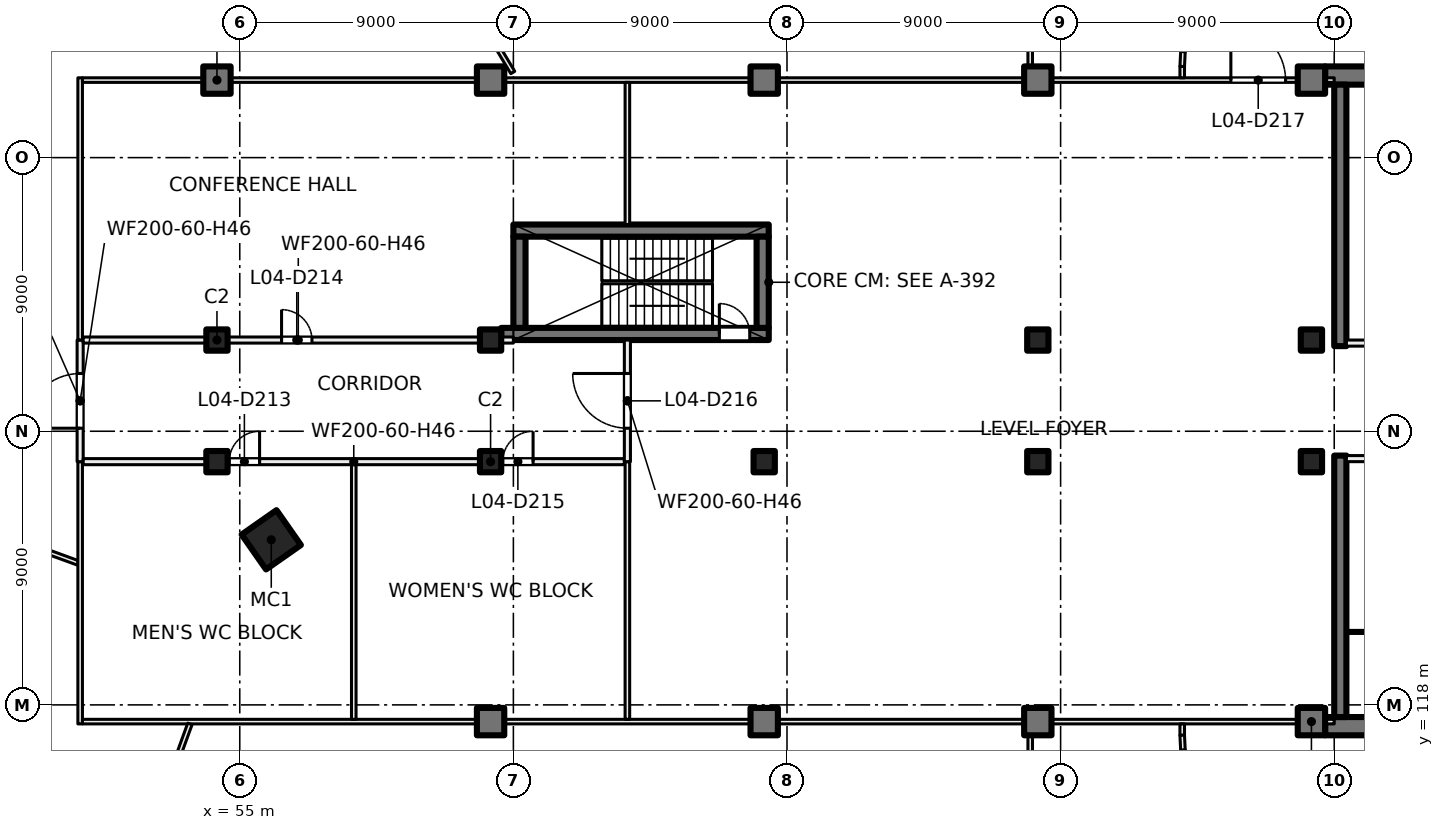
"""IFC4 building model, lengths in metres.
Left out: names, types, materials, properties, quantities, classifications, styles, units other than length and angle.
Written with IfcOpenShell. Run it as: python <this file> out.ifc"""

import sys

from ifc_helpers import new_model, si_unit, direction, frame, frame_2d, origin, origin_2d, place, context, subcontext, project, spatial, rectangle, hollow_rectangle, extrude, element, fill, save


model = new_model("IFC4")
c1 = context("Model", 3, precision=1e-05, world=origin(), true_north=direction((0.0, 1.0)))
c2 = subcontext(c1, "Body", "Model", "MODEL_VIEW")
j1 = project(units=[si_unit("LENGTHUNIT", "METRE"), si_unit("PLANEANGLEUNIT", "RADIAN")], contexts=[c1])
p1 = place(None, origin())
s1 = spatial("IfcSite", under=j1, at=p1, CompositionType="ELEMENT")
p2 = place(p1, origin())
s2 = spatial("IfcBuilding", under=s1, at=p2, CompositionType="ELEMENT")
p3 = place(p2, frame((0.0, 0.0, 22.5)))
s3 = spatial("IfcBuildingStorey", under=s2, at=p3, CompositionType="ELEMENT", Elevation=22.5)
p4 = place(p3, frame((56.036, 123.43, 0.0), z_axis=(0.0, 0.0, 1.0), x_axis=(0.573576436351, -0.819152044289, 0.0)))
e1 = element("IfcColumn", 1, at=p4, inside=s3, PredefinedType="COLUMN", context=c2, shape_type="SweptSolid", body=[
    extrude(hollow_rectangle(XDim=1.4, YDim=1.4, WallThickness=0.04, at=origin_2d()), origin(), (0.0, 0.0, 1.0), 5.0),
])
for number, where, z_axis, x_axis in (
    (2, (54.25, 130.0, 0.0), (0.0, 0.0, 1.0), (1.0, 0.0, 0.0)),
    (3, (63.25, 130.0, 0.0), (0.0, 0.0, 1.0), (1.0, 0.0, 0.0)),
    (4, (81.25, 130.0, 0.0), (0.0, 0.0, 1.0), (1.0, 0.0, 0.0)),
    (5, (90.25, 130.0, 0.0), (0.0, 0.0, 1.0), (1.0, 0.0, 0.0)),
    (6, (54.25, 126.0, 0.0), (0.0, 0.0, 1.0), (1.0, 0.0, 0.0)),
    (7, (63.25, 126.0, 0.0), (0.0, 0.0, 1.0), (1.0, 0.0, 0.0)),
    (8, (72.25, 126.0, 0.0), (0.0, 0.0, 1.0), (1.0, 0.0, 0.0)),
    (9, (81.25, 126.0, 0.0), (0.0, 0.0, 1.0), (1.0, 0.0, 0.0)),
    (10, (90.25, 126.0, 0.0), (0.0, 0.0, 1.0), (1.0, 0.0, 0.0)),
):
    element("IfcColumn", number, at=place(p3, frame(where, z_axis=z_axis, x_axis=x_axis)), inside=s3, PredefinedType="COLUMN", context=c2, shape_type="SweptSolid", body=[
        extrude(rectangle(XDim=0.7, YDim=0.7, at=origin_2d()), origin(), (0.0, 0.0, 1.0), 5.0),
    ])
for number, where, z_axis, x_axis in (
    (11, (54.25, 138.55, 0.0), (0.0, 0.0, 1.0), (1.0, 0.0, 0.0)),
    (12, (63.25, 138.55, 0.0), (0.0, 0.0, 1.0), (1.0, 0.0, 0.0)),
    (13, (72.25, 138.55, 0.0), (0.0, 0.0, 1.0), (1.0, 0.0, 0.0)),
    (14, (81.25, 138.55, 0.0), (0.0, 0.0, 1.0), (1.0, 0.0, 0.0)),
    (15, (90.25, 138.55, 0.0), (0.0, 0.0, 1.0), (1.0, 0.0, 0.0)),
    (16, (63.25, 117.45, 0.0), (0.0, 0.0, 1.0), (1.0, 0.0, 0.0)),
    (17, (72.25, 117.45, 0.0), (0.0, 0.0, 1.0), (1.0, 0.0, 0.0)),
    (18, (81.25, 117.45, 0.0), (0.0, 0.0, 1.0), (1.0, 0.0, 0.0)),
    (19, (90.25, 117.45, 0.0), (0.0, 0.0, 1.0), (1.0, 0.0, 0.0)),
):
    element("IfcColumn", number, at=place(p3, frame(where, z_axis=z_axis, x_axis=x_axis)), inside=s3, PredefinedType="COLUMN", context=c2, shape_type="SweptSolid", body=[
        extrude(rectangle(XDim=0.9, YDim=0.9, at=origin_2d()), origin(), (0.0, 0.0, 1.0), 5.0),
    ])
for number, where, z_axis, x_axis in (
    (20, (99.6, 138.7, 0.0), (0.0, 0.0, 1.0), (-1.0, 0.0, 0.0)),
    (21, (99.6, 117.3, 0.0), (0.0, 0.0, 1.0), (-1.0, 0.0, 0.0)),
):
    element("IfcWall", number, at=place(p3, frame(where, z_axis=z_axis, x_axis=x_axis)), inside=s3, PredefinedType="SHEAR", context=c2, shape_type="SweptSolid", body=[
        extrude(rectangle(XDim=8.9, YDim=0.6, at=frame_2d((4.45, 0.0))), origin(), (0.0, 0.0, 1.0), 5.0),
    ])
for number, where, z_axis, x_axis in (
    (22, (91.2, 138.4, 0.0), (0.0, 0.0, 1.0), (0.0, -1.0, 0.0)),
    (23, (91.2, 126.2, 0.0), (0.0, 0.0, 1.0), (0.0, -1.0, 0.0)),
):
    element("IfcWall", number, at=place(p3, frame(where, z_axis=z_axis, x_axis=x_axis)), inside=s3, PredefinedType="SHEAR", context=c2, shape_type="SweptSolid", body=[
        extrude(rectangle(XDim=8.6, YDim=0.4, at=frame_2d((4.3, 0.0))), origin(), (0.0, 0.0, 1.0), 5.0),
    ])
p5 = place(p3, frame((63.6, 130.2, 0.0), z_axis=(0.0, 0.0, 1.0), x_axis=(1.0, 0.0, 0.0)))
e24 = element("IfcWall", 24, at=p5, inside=s3, PredefinedType="SHEAR", context=c2, shape_type="SweptSolid", body=[
    extrude(rectangle(XDim=8.8, YDim=0.4, at=frame_2d((4.4, 0.0))), origin(), (0.0, 0.0, 1.0), 5.0),
])
p6 = place(p5, frame((7.175, 0.0, 0.0)))
e25 = element("IfcOpeningElement", 25, at=p6, cuts=e24, PredefinedType="OPENING", context=c2, shape_type="SweptSolid", body=[
    extrude(rectangle(XDim=1.0, YDim=2.1, at=frame_2d((0.5, 1.05))), frame((0.0, 0.21, 0.0), z_axis=(0.0, -1.0, 0.0), x_axis=(1.0, 0.0, 0.0)), (0.0, 0.0, 1.0), 0.42),
])
p7 = place(p3, frame((64.0, 133.6, 0.0), z_axis=(0.0, 0.0, 1.0), x_axis=(1.0, 0.0, 0.0)))
e26 = element("IfcWall", 26, at=p7, inside=s3, PredefinedType="SHEAR", context=c2, shape_type="SweptSolid", body=[
    extrude(rectangle(XDim=8.4, YDim=0.4, at=frame_2d((4.2, 0.0))), origin(), (0.0, 0.0, 1.0), 5.0),
])
for number, where, z_axis, x_axis in (
    (27, (64.2, 130.4, 0.0), (0.0, 0.0, 1.0), (0.0, 1.0, 0.0)),
    (28, (72.2, 130.4, 0.0), (0.0, 0.0, 1.0), (0.0, 1.0, 0.0)),
):
    element("IfcWall", number, at=place(p3, frame(where, z_axis=z_axis, x_axis=x_axis)), inside=s3, PredefinedType="SHEAR", context=c2, shape_type="SweptSolid", body=[
        extrude(rectangle(XDim=3.0, YDim=0.4, at=frame_2d((1.5, 0.0))), origin(), (0.0, 0.0, 1.0), 5.0),
    ])
p8 = place(p3, frame((95.2, 126.1, 0.0), z_axis=(0.0, 0.0, 1.0), x_axis=(-1.0, 0.0, 0.0)))
e29 = element("IfcWall", 29, at=p8, inside=s3, PredefinedType="PARTITIONING", context=c2, shape_type="SweptSolid", body=[
    extrude(rectangle(XDim=3.8, YDim=0.2, at=frame_2d((1.9, 0.0))), origin(), (0.0, 0.0, 1.0), 4.625),
])
p9 = place(p8, frame((0.3, 0.0, 0.0)))
e30 = element("IfcOpeningElement", 30, at=p9, cuts=e29, PredefinedType="OPENING", context=c2, shape_type="SweptSolid", body=[
    extrude(rectangle(XDim=1.2, YDim=2.1, at=frame_2d((0.6, 1.05))), frame((0.0, 0.11, 0.0), z_axis=(0.0, -1.0, 0.0), x_axis=(1.0, 0.0, 0.0)), (0.0, 0.0, 1.0), 0.22),
])
p10 = place(p3, frame((93.35, 120.4, 0.0), z_axis=(0.0, 0.0, 1.0), x_axis=(-1.0, 0.0, 0.0)))
e31 = element("IfcWall", 31, at=p10, inside=s3, PredefinedType="PARTITIONING", context=c2, shape_type="SweptSolid", body=[
    extrude(rectangle(XDim=1.95, YDim=0.1, at=frame_2d((0.975, 0.0))), origin(), (0.0, 0.0, 1.0), 4.625),
])
p11 = place(p3, frame((91.4, 129.9, 0.0), z_axis=(0.0, 0.0, 1.0), x_axis=(1.0, 0.0, 0.0)))
e32 = element("IfcWall", 32, at=p11, inside=s3, PredefinedType="PARTITIONING", context=c2, shape_type="SweptSolid", body=[
    extrude(rectangle(XDim=3.8, YDim=0.2, at=frame_2d((1.9, 0.0))), origin(), (0.0, 0.0, 1.0), 4.625),
])
p12 = place(p11, frame((2.3, 0.0, 0.0)))
e33 = element("IfcOpeningElement", 33, at=p12, cuts=e32, PredefinedType="OPENING", context=c2, shape_type="SweptSolid", body=[
    extrude(rectangle(XDim=1.2, YDim=2.1, at=frame_2d((0.6, 1.05))), frame((0.0, 0.11, 0.0), z_axis=(0.0, -1.0, 0.0), x_axis=(1.0, 0.0, 0.0)), (0.0, 0.0, 1.0), 0.22),
])
p13 = place(p3, frame((46.597, 123.792, 0.0), z_axis=(0.0, 0.0, 1.0), x_axis=(0.939619227089, -0.342221723572, 0.0)))
e34 = element("IfcWall", 34, at=p13, inside=s3, PredefinedType="PARTITIONING", context=c2, shape_type="SweptSolid", body=[
    extrude(rectangle(XDim=3.276, YDim=0.15, at=frame_2d((1.638, 0.0))), origin(), (0.0, 0.0, 1.0), 4.625),
])
p14 = place(p3, frame((49.75, 117.375, 0.0), z_axis=(0.0, 0.0, 1.0), x_axis=(0.0, 1.0, 0.0)))
e35 = element("IfcWall", 35, at=p14, inside=s3, PredefinedType="PARTITIONING", context=c2, shape_type="SweptSolid", body=[
    extrude(rectangle(XDim=8.625, YDim=0.15, at=frame_2d((4.312, 0.0))), origin(), (0.0, 0.0, 1.0), 4.625),
])
p15 = place(p3, frame((49.825, 117.45, 0.0), z_axis=(0.0, 0.0, 1.0), x_axis=(1.0, 0.0, 0.0)))
e36 = element("IfcWall", 36, at=p15, inside=s3, PredefinedType="PARTITIONING", context=c2, shape_type="SweptSolid", body=[
    extrude(rectangle(XDim=41.175, YDim=0.15, at=frame_2d((20.587, 0.0))), origin(), (0.0, 0.0, 1.0), 4.625),
])
p16 = place(p3, frame((49.75, 126.0, 0.0), z_axis=(0.0, 0.0, 1.0), x_axis=(0.0, 1.0, 0.0)))
e37 = element("IfcWall", 37, at=p16, inside=s3, PredefinedType="PARTITIONING", context=c2, shape_type="SweptSolid", body=[
    extrude(rectangle(XDim=4.0, YDim=0.2, at=frame_2d((2.0, 0.0))), origin(), (0.0, 0.0, 1.0), 4.625),
])
p17 = place(p16, frame((1.1, 0.0, 0.0)))
e38 = element("IfcOpeningElement", 38, at=p17, cuts=e37, PredefinedType="OPENING", context=c2, shape_type="SweptSolid", body=[
    extrude(rectangle(XDim=1.8, YDim=2.1, at=frame_2d((0.9, 1.05))), frame((0.0, 0.11, 0.0), z_axis=(0.0, -1.0, 0.0), x_axis=(1.0, 0.0, 0.0)), (0.0, 0.0, 1.0), 0.22),
])
p18 = place(p3, frame((67.65, 126.0, 0.0), z_axis=(0.0, 0.0, 1.0), x_axis=(-1.0, 0.0, 0.0)))
e39 = element("IfcWall", 39, at=p18, inside=s3, PredefinedType="PARTITIONING", context=c2, shape_type="SweptSolid", body=[
    extrude(rectangle(XDim=17.8, YDim=0.2, at=frame_2d((8.9, 0.0))), origin(), (0.0, 0.0, 1.0), 4.625),
])
p19 = place(p18, frame((11.998, 0.0, 0.0)))
e40 = element("IfcOpeningElement", 40, at=p19, cuts=e39, PredefinedType="OPENING", context=c2, shape_type="SweptSolid", body=[
    extrude(rectangle(XDim=1.0, YDim=2.1, at=frame_2d((0.5, 1.05))), frame((0.0, 0.11, 0.0), z_axis=(0.0, -1.0, 0.0), x_axis=(1.0, 0.0, 0.0)), (0.0, 0.0, 1.0), 0.22),
])
p20 = place(p18, frame((3.002, 0.0, 0.0)))
e41 = element("IfcOpeningElement", 41, at=p20, cuts=e39, PredefinedType="OPENING", context=c2, shape_type="SweptSolid", body=[
    extrude(rectangle(XDim=1.0, YDim=2.1, at=frame_2d((0.5, 1.05))), frame((0.0, 0.11, 0.0), z_axis=(0.0, -1.0, 0.0), x_axis=(1.0, 0.0, 0.0)), (0.0, 0.0, 1.0), 0.22),
])
p21 = place(p3, frame((49.75, 130.0, 0.0), z_axis=(0.0, 0.0, 1.0), x_axis=(0.0, 1.0, 0.0)))
e42 = element("IfcWall", 42, at=p21, inside=s3, PredefinedType="PARTITIONING", context=c2, shape_type="SweptSolid", body=[
    extrude(rectangle(XDim=8.625, YDim=0.15, at=frame_2d((4.312, 0.0))), origin(), (0.0, 0.0, 1.0), 4.625),
])
p22 = place(p3, frame((49.85, 130.0, 0.0), z_axis=(0.0, 0.0, 1.0), x_axis=(1.0, 0.0, 0.0)))
e43 = element("IfcWall", 43, at=p22, inside=s3, PredefinedType="PARTITIONING", context=c2, shape_type="SweptSolid", body=[
    extrude(rectangle(XDim=14.15, YDim=0.2, at=frame_2d((7.075, 0.0))), origin(), (0.0, 0.0, 1.0), 4.625),
])
p23 = place(p22, frame((6.525, 0.0, 0.0)))
e44 = element("IfcOpeningElement", 44, at=p23, cuts=e43, PredefinedType="OPENING", context=c2, shape_type="SweptSolid", body=[
    extrude(rectangle(XDim=1.0, YDim=2.1, at=frame_2d((0.5, 1.05))), frame((0.0, 0.11, 0.0), z_axis=(0.0, -1.0, 0.0), x_axis=(1.0, 0.0, 0.0)), (0.0, 0.0, 1.0), 0.22),
])
p24 = place(p3, frame((49.825, 138.55, 0.0), z_axis=(0.0, 0.0, 1.0), x_axis=(1.0, 0.0, 0.0)))
e45 = element("IfcWall", 45, at=p24, inside=s3, PredefinedType="PARTITIONING", context=c2, shape_type="SweptSolid", body=[
    extrude(rectangle(XDim=41.175, YDim=0.15, at=frame_2d((20.587, 0.0))), origin(), (0.0, 0.0, 1.0), 4.625),
])
p25 = place(p24, frame((37.775, 0.0, 0.0)))
e46 = element("IfcOpeningElement", 46, at=p25, cuts=e45, PredefinedType="OPENING", context=c2, shape_type="SweptSolid", body=[
    extrude(rectangle(XDim=1.8, YDim=2.1, at=frame_2d((0.9, 1.05))), frame((0.0, 0.085, 0.0), z_axis=(0.0, -1.0, 0.0), x_axis=(1.0, 0.0, 0.0)), (0.0, 0.0, 1.0), 0.17),
])
p26 = place(p3, frame((50.014, 108.182, 0.0), z_axis=(0.0, 0.0, 1.0), x_axis=(0.342035586721, 0.939686999706, 0.0)))
e47 = element("IfcWall", 47, at=p26, inside=s3, PredefinedType="PARTITIONING", context=c2, shape_type="SweptSolid", body=[
    extrude(rectangle(XDim=9.783, YDim=0.15, at=frame_2d((4.892, 0.0))), origin(), (0.0, 0.0, 1.0), 4.625),
])
p27 = place(p3, frame((58.75, 117.525, 0.0), z_axis=(0.0, 0.0, 1.0), x_axis=(0.0, 1.0, 0.0)))
e48 = element("IfcWall", 48, at=p27, inside=s3, PredefinedType="PARTITIONING", context=c2, shape_type="SweptSolid", body=[
    extrude(rectangle(XDim=8.375, YDim=0.15, at=frame_2d((4.188, 0.0))), origin(), (0.0, 0.0, 1.0), 4.625),
])
p28 = place(p3, frame((63.459, 139.67, 0.0), z_axis=(0.0, 0.0, 1.0), x_axis=(0.514106720628, -0.857726226604, 0.0)))
e49 = element("IfcWall", 49, at=p28, inside=s3, PredefinedType="PARTITIONING", context=c2, shape_type="SweptSolid", body=[
    extrude(rectangle(XDim=1.015, YDim=0.15, at=frame_2d((0.508, 0.0))), origin(), (0.0, 0.0, 1.0), 4.625),
])
p29 = place(p3, frame((67.75, 117.525, 0.0), z_axis=(0.0, 0.0, 1.0), x_axis=(0.0, 1.0, 0.0)))
e50 = element("IfcWall", 50, at=p29, inside=s3, PredefinedType="PARTITIONING", context=c2, shape_type="SweptSolid", body=[
    extrude(rectangle(XDim=8.475, YDim=0.15, at=frame_2d((4.238, 0.0))), origin(), (0.0, 0.0, 1.0), 4.625),
])
p30 = place(p3, frame((67.75, 130.0, 0.0), z_axis=(0.0, 0.0, 1.0), x_axis=(0.0, -1.0, 0.0)))
e51 = element("IfcWall", 51, at=p30, inside=s3, PredefinedType="PARTITIONING", context=c2, shape_type="SweptSolid", body=[
    extrude(rectangle(XDim=4.0, YDim=0.2, at=frame_2d((2.0, 0.0))), origin(), (0.0, 0.0, 1.0), 4.625),
])
p31 = place(p30, frame((1.1, 0.0, 0.0)))
e52 = element("IfcOpeningElement", 52, at=p31, cuts=e51, PredefinedType="OPENING", context=c2, shape_type="SweptSolid", body=[
    extrude(rectangle(XDim=1.8, YDim=2.1, at=frame_2d((0.9, 1.05))), frame((0.0, 0.11, 0.0), z_axis=(0.0, -1.0, 0.0), x_axis=(1.0, 0.0, 0.0)), (0.0, 0.0, 1.0), 0.22),
])
p32 = place(p3, frame((67.75, 133.8, 0.0), z_axis=(0.0, 0.0, 1.0), x_axis=(0.0, 1.0, 0.0)))
e53 = element("IfcWall", 53, at=p32, inside=s3, PredefinedType="PARTITIONING", context=c2, shape_type="SweptSolid", body=[
    extrude(rectangle(XDim=4.675, YDim=0.15, at=frame_2d((2.337, 0.0))), origin(), (0.0, 0.0, 1.0), 4.625),
])
p33 = place(p3, frame((81.0, 107.925, 0.0), z_axis=(0.0, 0.0, 1.0), x_axis=(0.0, 1.0, 0.0)))
e54 = element("IfcWall", 54, at=p33, inside=s3, PredefinedType="PARTITIONING", context=c2, shape_type="SweptSolid", body=[
    extrude(rectangle(XDim=9.45, YDim=0.15, at=frame_2d((4.725, 0.0))), origin(), (0.0, 0.0, 1.0), 4.625),
])
p34 = place(p3, frame((81.0, 138.625, 0.0), z_axis=(0.0, 0.0, 1.0), x_axis=(0.0, 1.0, 0.0)))
e55 = element("IfcWall", 55, at=p34, inside=s3, PredefinedType="PARTITIONING", context=c2, shape_type="SweptSolid", body=[
    extrude(rectangle(XDim=7.775, YDim=0.15, at=frame_2d((3.887, 0.0))), origin(), (0.0, 0.0, 1.0), 4.625),
])
p35 = place(p3, frame((86.0, 116.998, 0.0), z_axis=(0.0, 0.0, 1.0), x_axis=(0.0, 1.0, 0.0)))
e56 = element("IfcWall", 56, at=p35, inside=s3, PredefinedType="PARTITIONING", context=c2, shape_type="SweptSolid", body=[
    extrude(rectangle(XDim=0.377, YDim=0.15, at=frame_2d((0.188, 0.0))), origin(), (0.0, 0.0, 1.0), 4.625),
])
p36 = place(p3, frame((86.0, 117.002, 0.0), z_axis=(0.0, 0.0, 1.0), x_axis=(0.048196018647, -0.998837896651, 0.0)))
e57 = element("IfcWall", 57, at=p36, inside=s3, PredefinedType="PARTITIONING", context=c2, shape_type="SweptSolid", body=[
    extrude(rectangle(XDim=0.496, YDim=0.15, at=frame_2d((0.248, 0.0))), origin(), (0.0, 0.0, 1.0), 4.625),
])
p37 = place(p3, frame((86.0, 138.625, 0.0), z_axis=(0.0, 0.0, 1.0), x_axis=(0.0, 1.0, 0.0)))
e58 = element("IfcWall", 58, at=p37, inside=s3, PredefinedType="PARTITIONING", context=c2, shape_type="SweptSolid", body=[
    extrude(rectangle(XDim=0.377, YDim=0.15, at=frame_2d((0.188, 0.0))), origin(), (0.0, 0.0, 1.0), 4.625),
])
p38 = place(p3, frame((86.0, 138.998, 0.0), z_axis=(0.0, 0.0, 1.0), x_axis=(0.048196018647, 0.998837896651, 0.0)))
e59 = element("IfcWall", 59, at=p38, inside=s3, PredefinedType="PARTITIONING", context=c2, shape_type="SweptSolid", body=[
    extrude(rectangle(XDim=0.496, YDim=0.15, at=frame_2d((0.248, 0.0))), origin(), (0.0, 0.0, 1.0), 4.625),
])
p39 = place(p3, frame((86.023, 139.486, 0.0), z_axis=(0.0, 0.0, 1.0), x_axis=(0.148412307247, 0.988925572052, 0.0)))
e60 = element("IfcWall", 60, at=p39, inside=s3, PredefinedType="PARTITIONING", context=c2, shape_type="SweptSolid", body=[
    extrude(rectangle(XDim=0.499, YDim=0.15, at=frame_2d((0.249, 0.0))), origin(), (0.0, 0.0, 1.0), 4.625),
])
p40 = place(p6, origin())
e61 = element("IfcDoor", 61, at=p40, inside=s3, OperationType="SINGLE_SWING_LEFT", PredefinedType="DOOR", context=c2, shape_type="SweptSolid", body=[
    extrude(rectangle(XDim=1.0, YDim=2.1, at=frame_2d((0.5, 1.05))), frame((0.0, 0.025, 0.0), z_axis=(0.0, -1.0, 0.0), x_axis=(1.0, 0.0, 0.0)), (0.0, 0.0, 1.0), 0.05),
])
fill(e25, e61)
p41 = place(p17, origin())
e62 = element("IfcDoor", 62, at=p41, inside=s3, OperationType="DOUBLE_DOOR_SINGLE_SWING", PredefinedType="DOOR", context=c2, shape_type="SweptSolid", body=[
    extrude(rectangle(XDim=1.8, YDim=2.1, at=frame_2d((0.9, 1.05))), frame((0.0, 0.025, 0.0), z_axis=(0.0, -1.0, 0.0), x_axis=(1.0, 0.0, 0.0)), (0.0, 0.0, 1.0), 0.05),
])
fill(e38, e62)
p42 = place(p19, origin())
e63 = element("IfcDoor", 63, at=p42, inside=s3, OperationType="SINGLE_SWING_LEFT", PredefinedType="DOOR", context=c2, shape_type="SweptSolid", body=[
    extrude(rectangle(XDim=1.0, YDim=2.1, at=frame_2d((0.5, 1.05))), frame((0.0, 0.025, 0.0), z_axis=(0.0, -1.0, 0.0), x_axis=(1.0, 0.0, 0.0)), (0.0, 0.0, 1.0), 0.05),
])
fill(e40, e63)
p43 = place(p23, origin())
e64 = element("IfcDoor", 64, at=p43, inside=s3, OperationType="SINGLE_SWING_LEFT", PredefinedType="DOOR", context=c2, shape_type="SweptSolid", body=[
    extrude(rectangle(XDim=1.0, YDim=2.1, at=frame_2d((0.5, 1.05))), frame((0.0, 0.025, 0.0), z_axis=(0.0, -1.0, 0.0), x_axis=(1.0, 0.0, 0.0)), (0.0, 0.0, 1.0), 0.05),
])
fill(e44, e64)
p44 = place(p20, origin())
e65 = element("IfcDoor", 65, at=p44, inside=s3, OperationType="SINGLE_SWING_LEFT", PredefinedType="DOOR", context=c2, shape_type="SweptSolid", body=[
    extrude(rectangle(XDim=1.0, YDim=2.1, at=frame_2d((0.5, 1.05))), frame((0.0, 0.025, 0.0), z_axis=(0.0, -1.0, 0.0), x_axis=(1.0, 0.0, 0.0)), (0.0, 0.0, 1.0), 0.05),
])
fill(e41, e65)
p45 = place(p31, origin())
e66 = element("IfcDoor", 66, at=p45, inside=s3, OperationType="DOUBLE_DOOR_SINGLE_SWING", PredefinedType="DOOR", context=c2, shape_type="SweptSolid", body=[
    extrude(rectangle(XDim=1.8, YDim=2.1, at=frame_2d((0.9, 1.05))), frame((0.0, 0.025, 0.0), z_axis=(0.0, -1.0, 0.0), x_axis=(1.0, 0.0, 0.0)), (0.0, 0.0, 1.0), 0.05),
])
fill(e52, e66)
p46 = place(p25, origin())
e67 = element("IfcDoor", 67, at=p46, inside=s3, OperationType="DOUBLE_DOOR_SINGLE_SWING", PredefinedType="DOOR", context=c2, shape_type="SweptSolid", body=[
    extrude(rectangle(XDim=1.8, YDim=2.1, at=frame_2d((0.9, 1.05))), frame((0.0, 0.025, 0.0), z_axis=(0.0, -1.0, 0.0), x_axis=(1.0, 0.0, 0.0)), (0.0, 0.0, 1.0), 0.05),
])
fill(e46, e67)
save(model, sys.argv[1])
